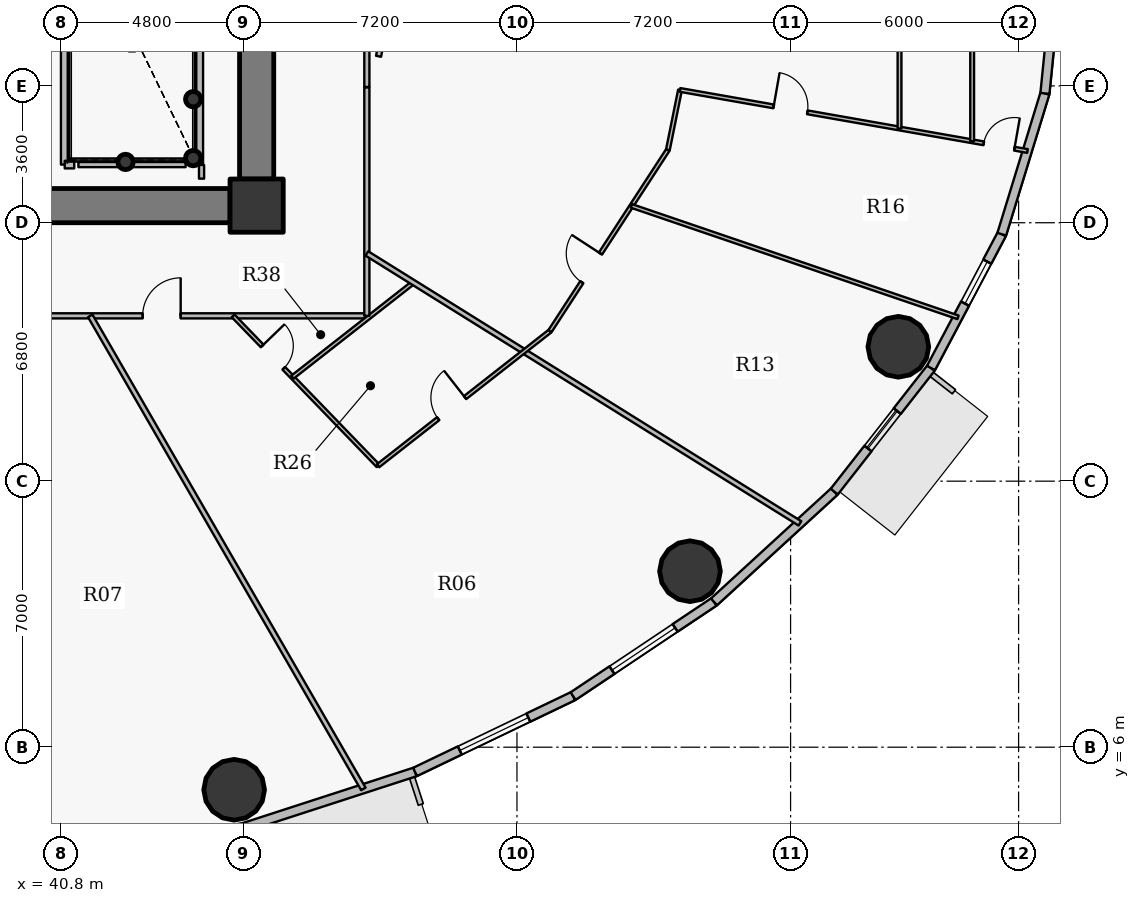
"""IFC4 building model, lengths in metres.
Left out: names, types, materials, properties, quantities, classifications, styles, units other than length and angle.
Written with IfcOpenShell. Run it as: python <this file> out.ifc"""

import sys

from ifc_helpers import new_model, si_unit, direction, frame, frame_2d, origin, origin_2d, place, context, subcontext, project, spatial, rectangle, hollow_circle, extrude, source, transform, mapped, element, fill, save


model = new_model("IFC4")
c1 = context("Model", 3, precision=1e-05, world=origin(), true_north=direction((0.0, 1.0)))
c2 = subcontext(c1, "Body", "Model", "MODEL_VIEW")
j1 = project(units=[si_unit("LENGTHUNIT", "METRE"), si_unit("PLANEANGLEUNIT", "RADIAN")], contexts=[c1])
p1 = place(None, origin())
s1 = spatial("IfcSite", under=j1, at=p1, CompositionType="ELEMENT")
p2 = place(p1, origin())
s2 = spatial("IfcBuilding", under=s1, at=p2, CompositionType="ELEMENT")
p3 = place(p2, frame((0.0, 0.0, 66.0)))
s3 = spatial("IfcBuildingStorey", under=s2, at=p3, CompositionType="ELEMENT", Elevation=66.0)
p4 = place(p3, frame((45.95, 20.25, 0.0), z_axis=(0.0, 0.0, 1.0), x_axis=(1.0, 0.0, 0.0)))
e1 = element("IfcColumn", 1, at=p4, inside=s3, PredefinedType="COLUMN", context=c2, shape_type="SweptSolid", body=[
    extrude(rectangle(XDim=1.4, YDim=1.4, at=origin_2d()), origin(), (0.0, 0.0, 1.0), 4.2),
])
for number, where, z_axis, x_axis in (
    (2, (44.28, 21.5, 0.0), (0.0, 0.0, 1.0), (1.0, 0.0, 0.0)),
    (3, (44.28, 23.05, 0.0), (0.0, 0.0, 1.0), (1.0, 0.0, 0.0)),
    (4, (42.5, 21.4, 0.0), (0.0, 0.0, 1.0), (1.0, 0.0, 0.0)),
):
    element("IfcColumn", number, at=place(p3, frame(where, z_axis=z_axis, x_axis=x_axis)), inside=s3, PredefinedType="COLUMN", context=c2, shape_type="SweptSolid", body=[
        extrude(hollow_circle(Radius=0.203, WallThickness=0.016, at=origin_2d()), origin(), (0.0, 0.0, 1.0), 4.2),
    ])
p5 = place(p3, frame((45.95, 33.05, 0.0), z_axis=(0.0, 0.0, 1.0), x_axis=(0.0, -1.0, 0.0)))
e5 = element("IfcWall", 5, at=p5, inside=s3, PredefinedType="SHEAR", context=c2, shape_type="SweptSolid", body=[
    extrude(rectangle(XDim=12.1, YDim=0.9, at=frame_2d((6.05, 0.0))), origin(), (0.0, 0.0, 1.0), 3.4),
])
p6 = place(p5, frame((5.64, 0.0, 0.0)))
e6 = element("IfcOpeningElement", 6, at=p6, cuts=e5, PredefinedType="OPENING", context=c2, shape_type="SweptSolid", body=[
    extrude(rectangle(XDim=0.82, YDim=2.1, at=origin_2d()), frame((0.41, 0.46, 1.05), z_axis=(0.0, -1.0, 0.0), x_axis=(1.0, 0.0, 0.0)), (0.0, 0.0, 1.0), 0.92),
])
p7 = place(p3, frame((45.25, 20.25, 0.0), z_axis=(0.0, 0.0, 1.0), x_axis=(-1.0, 0.0, 0.0)))
e7 = element("IfcWall", 7, at=p7, inside=s3, PredefinedType="SHEAR", context=c2, shape_type="SweptSolid", body=[
    extrude(rectangle(XDim=18.5, YDim=0.9, at=frame_2d((9.25, 0.0))), origin(), (0.0, 0.0, 1.0), 3.4),
])
p8 = place(p7, frame((10.0, 0.0, 0.0)))
e8 = element("IfcOpeningElement", 8, at=p8, cuts=e7, PredefinedType="OPENING", context=c2, shape_type="SweptSolid", body=[
    extrude(rectangle(XDim=1.15, YDim=2.15, at=origin_2d()), frame((0.575, 0.46, 1.075), z_axis=(0.0, -1.0, 0.0), x_axis=(1.0, 0.0, 0.0)), (0.0, 0.0, 1.0), 0.92),
])
for number, where, z_axis, x_axis in (
    (9, (45.358, 4.88, 0.0), (0.0, 0.0, 1.0), (1.0, 0.0, 0.0)),
    (10, (57.353, 10.631, 0.0), (0.0, 0.0, 1.0), (1.0, 0.0, 0.0)),
    (11, (62.835, 16.536, 0.0), (0.0, 0.0, 1.0), (1.0, 0.0, 0.0)),
):
    element("IfcColumn", number, at=place(p3, frame(where, z_axis=z_axis, x_axis=x_axis)), inside=s3, PredefinedType="COLUMN", context=c2, shape_type="SweptSolid", body=[
        extrude(hollow_circle(Radius=0.8, WallThickness=0.045, at=origin_2d()), origin(), (0.0, 0.0, 1.0), 4.2),
    ])
p9 = place(p3, frame((50.118, 5.349, 0.0), z_axis=(0.0, 0.0, 1.0), x_axis=(-0.951207699013, -0.308551313946, 0.0)))
e12 = element("IfcWall", 12, at=p9, inside=s3, PredefinedType="SOLIDWALL", context=c2, shape_type="SweptSolid", body=[
    extrude(rectangle(XDim=4.739, YDim=0.24, at=frame_2d((2.369, 0.0))), origin(), (0.0, 0.0, 1.0), 3.95),
])
p10 = place(p3, frame((54.277, 7.344, 0.0), z_axis=(0.0, 0.0, 1.0), x_axis=(-0.901601503137, -0.432567601123, 0.0)))
e13 = element("IfcWall", 13, at=p10, inside=s3, PredefinedType="SOLIDWALL", context=c2, shape_type="SweptSolid", body=[
    extrude(rectangle(XDim=4.613, YDim=0.24, at=frame_2d((2.306, 0.0))), origin(), (0.0, 0.0, 1.0), 3.95),
])
p11 = place(p10, frame((1.307, 0.0, 0.9)))
e14 = element("IfcOpeningElement", 14, at=p11, cuts=e13, PredefinedType="OPENING", context=c2, shape_type="SweptSolid", body=[
    extrude(rectangle(XDim=2.0, YDim=1.75, at=origin_2d()), frame((1.0, 0.13, 0.875), z_axis=(0.0, -1.0, 0.0), x_axis=(1.0, 0.0, 0.0)), (0.0, 0.0, 1.0), 0.26),
])
p12 = place(p3, frame((57.985, 9.824, 0.0), z_axis=(0.0, 0.0, 1.0), x_axis=(-0.831240982525, -0.555912249343, 0.0)))
e15 = element("IfcWall", 15, at=p12, inside=s3, PredefinedType="SOLIDWALL", context=c2, shape_type="SweptSolid", body=[
    extrude(rectangle(XDim=4.46, YDim=0.24, at=frame_2d((2.23, 0.0))), origin(), (0.0, 0.0, 1.0), 3.95),
])
p13 = place(p12, frame((1.23, 0.0, 0.9)))
e16 = element("IfcOpeningElement", 16, at=p13, cuts=e15, PredefinedType="OPENING", context=c2, shape_type="SweptSolid", body=[
    extrude(rectangle(XDim=2.0, YDim=1.75, at=origin_2d()), frame((1.0, 0.13, 0.875), z_axis=(0.0, -1.0, 0.0), x_axis=(1.0, 0.0, 0.0)), (0.0, 0.0, 1.0), 0.26),
])
p14 = place(p3, frame((61.15, 12.725, 0.0), z_axis=(0.0, 0.0, 1.0), x_axis=(-0.737116376281, -0.67576582321, 0.0)))
e17 = element("IfcWall", 17, at=p14, inside=s3, PredefinedType="SOLIDWALL", context=c2, shape_type="SweptSolid", body=[
    extrude(rectangle(XDim=4.294, YDim=0.24, at=frame_2d((2.147, 0.0))), origin(), (0.0, 0.0, 1.0), 3.95),
])
p15 = place(p3, frame((63.695, 15.977, 0.0), z_axis=(0.0, 0.0, 1.0), x_axis=(-0.616295508253, -0.787514981767, 0.0)))
e18 = element("IfcWall", 18, at=p15, inside=s3, PredefinedType="SOLIDWALL", context=c2, shape_type="SweptSolid", body=[
    extrude(rectangle(XDim=4.129, YDim=0.24, at=frame_2d((2.065, 0.0))), origin(), (0.0, 0.0, 1.0), 3.95),
])
p16 = place(p15, frame((1.44, 0.0, 0.9)))
e19 = element("IfcOpeningElement", 19, at=p16, cuts=e18, PredefinedType="OPENING", context=c2, shape_type="SweptSolid", body=[
    extrude(rectangle(XDim=1.25, YDim=1.65, at=origin_2d()), frame((0.625, 0.13, 0.825), z_axis=(0.0, -1.0, 0.0), x_axis=(1.0, 0.0, 0.0)), (0.0, 0.0, 1.0), 0.26),
])
p17 = place(p3, frame((65.558, 19.499, 0.0), z_axis=(0.0, 0.0, 1.0), x_axis=(-0.467662443071, -0.883907144072, 0.0)))
e20 = element("IfcWall", 20, at=p17, inside=s3, PredefinedType="SOLIDWALL", context=c2, shape_type="SweptSolid", body=[
    extrude(rectangle(XDim=3.984, YDim=0.24, at=frame_2d((1.992, 0.0))), origin(), (0.0, 0.0, 1.0), 3.95),
])
p18 = place(p17, frame((0.817, 0.0, 0.9)))
e21 = element("IfcOpeningElement", 21, at=p18, cuts=e20, PredefinedType="OPENING", context=c2, shape_type="SweptSolid", body=[
    extrude(rectangle(XDim=1.25, YDim=1.65, at=origin_2d()), frame((0.625, 0.13, 0.825), z_axis=(0.0, -1.0, 0.0), x_axis=(1.0, 0.0, 0.0)), (0.0, 0.0, 1.0), 0.26),
])
p19 = place(p3, frame((66.693, 23.203, 0.0), z_axis=(0.0, 0.0, 1.0), x_axis=(-0.293111631758, -0.956078224482, 0.0)))
e22 = element("IfcWall", 22, at=p19, inside=s3, PredefinedType="SOLIDWALL", context=c2, shape_type="SweptSolid", body=[
    extrude(rectangle(XDim=3.875, YDim=0.24, at=frame_2d((1.938, 0.0))), origin(), (0.0, 0.0, 1.0), 3.95),
])
p20 = place(p3, frame((67.075, 27.0, 0.0), z_axis=(0.0, 0.0, 1.0), x_axis=(-0.099997795174, -0.994987658698, 0.0)))
e23 = element("IfcWall", 23, at=p20, inside=s3, PredefinedType="SOLIDWALL", context=c2, shape_type="SweptSolid", body=[
    extrude(rectangle(XDim=3.816, YDim=0.24, at=frame_2d((1.908, 0.0))), origin(), (0.0, 0.0, 1.0), 3.95),
])
p21 = place(p3, frame((37.362, 17.35, 0.0), z_axis=(0.0, 0.0, 1.0), x_axis=(1.0, 0.0, 0.0)))
e24 = element("IfcWall", 24, at=p21, inside=s3, PredefinedType="PARTITIONING", context=c2, shape_type="SweptSolid", body=[
    extrude(rectangle(XDim=11.488, YDim=0.135, at=frame_2d((5.744, 0.0))), origin(), (0.0, 0.0, 1.0), 3.285),
])
p22 = place(p21, frame((1.625, 0.0, 0.0)))
e25 = element("IfcOpeningElement", 25, at=p22, cuts=e24, PredefinedType="OPENING", context=c2, shape_type="SweptSolid", body=[
    extrude(rectangle(XDim=1.0, YDim=2.15, at=origin_2d()), frame((0.5, 0.078, 1.075), z_axis=(0.0, -1.0, 0.0), x_axis=(1.0, 0.0, 0.0)), (0.0, 0.0, 1.0), 0.155),
])
p23 = place(p21, frame((5.589, 0.0, 0.0)))
e26 = element("IfcOpeningElement", 26, at=p23, cuts=e24, PredefinedType="OPENING", context=c2, shape_type="SweptSolid", body=[
    extrude(rectangle(XDim=1.0, YDim=2.15, at=origin_2d()), frame((0.5, 0.078, 1.075), z_axis=(0.0, -1.0, 0.0), x_axis=(1.0, 0.0, 0.0)), (0.0, 0.0, 1.0), 0.155),
])
p24 = place(p3, frame((40.9, 21.33, 0.0), z_axis=(0.0, 0.0, 1.0), x_axis=(0.0, 1.0, 0.0)))
e27 = element("IfcWall", 27, at=p24, inside=s3, PredefinedType="PARTITIONING", context=c2, shape_type="SweptSolid", body=[
    extrude(rectangle(XDim=5.91, YDim=0.2, at=frame_2d((2.955, 0.0))), origin(), (0.0, 0.0, 1.0), 3.485),
])
p25 = place(p3, frame((40.9, 21.33, 0.0), z_axis=(0.0, 0.0, 1.0), x_axis=(1.0, 0.0, 0.0)))
e28 = element("IfcWall", 28, at=p25, inside=s3, PredefinedType="PARTITIONING", context=c2, shape_type="SweptSolid", body=[
    extrude(rectangle(XDim=0.25, YDim=0.2, at=frame_2d((0.125, 0.0))), origin(), (0.0, 0.0, 1.0), 3.485),
])
p26 = place(p3, frame((41.572, 17.35, 0.0), z_axis=(0.0, 0.0, 1.0), x_axis=(0.499990052844, -0.866031146701, 0.0)))
e29 = element("IfcWall", 29, at=p26, inside=s3, PredefinedType="PARTITIONING", context=c2, shape_type="SweptSolid", body=[
    extrude(rectangle(XDim=14.373, YDim=0.135, at=frame_2d((7.187, 0.0))), origin(), (0.0, 0.0, 1.0), 3.335),
])
p27 = place(p3, frame((44.44, 21.33, 0.0), z_axis=(0.0, 0.0, 1.0), x_axis=(0.0, 1.0, 0.0)))
e30 = element("IfcWall", 30, at=p27, inside=s3, PredefinedType="PARTITIONING", context=c2, shape_type="SweptSolid", body=[
    extrude(rectangle(XDim=8.52, YDim=0.2, at=frame_2d((4.26, 0.0))), origin(), (0.0, 0.0, 1.0), 3.95),
])
p28 = place(p3, frame((45.33, 17.35, 0.0), z_axis=(0.0, 0.0, 1.0), x_axis=(0.695082659364, -0.718929827348, 0.0)))
e31 = element("IfcWall", 31, at=p28, inside=s3, PredefinedType="PARTITIONING", context=c2, shape_type="SweptSolid", body=[
    extrude(rectangle(XDim=5.487, YDim=0.1, at=frame_2d((2.744, 0.0))), origin(), (0.0, 0.0, 1.0), 3.95),
])
p29 = place(p28, frame((1.1, 0.0, 0.0)))
e32 = element("IfcOpeningElement", 32, at=p29, cuts=e31, PredefinedType="OPENING", context=c2, shape_type="SweptSolid", body=[
    extrude(rectangle(XDim=0.82, YDim=2.1, at=origin_2d()), frame((0.41, 0.06, 1.05), z_axis=(0.0, -1.0, 0.0), x_axis=(1.0, 0.0, 0.0)), (0.0, 0.0, 1.0), 0.12),
])
p30 = place(p3, frame((46.891, 15.736, 0.0), z_axis=(0.0, 0.0, 1.0), x_axis=(0.787335515078, 0.61652476568, 0.0)))
e33 = element("IfcWall", 33, at=p30, inside=s3, PredefinedType="PARTITIONING", context=c2, shape_type="SweptSolid", body=[
    extrude(rectangle(XDim=4.043, YDim=0.1, at=frame_2d((2.022, 0.0))), origin(), (0.0, 0.0, 1.0), 3.285),
])
p31 = place(p3, frame((48.85, 17.35, 0.0), z_axis=(0.0, 0.0, 1.0), x_axis=(0.0, 1.0, 0.0)))
e34 = element("IfcWall", 34, at=p31, inside=s3, PredefinedType="PARTITIONING", context=c2, shape_type="SweptSolid", body=[
    extrude(rectangle(XDim=6.011, YDim=0.135, at=frame_2d((3.006, 0.0))), origin(), (0.0, 0.0, 1.0), 3.285),
])
p32 = place(p3, frame((48.85, 18.991, 0.0), z_axis=(0.0, 0.0, 1.0), x_axis=(0.848674864049, -0.528914903488, 0.0)))
e35 = element("IfcWall", 35, at=p32, inside=s3, PredefinedType="PARTITIONING", context=c2, shape_type="SweptSolid", body=[
    extrude(rectangle(XDim=13.427, YDim=0.135, at=frame_2d((6.714, 0.0))), origin(), (0.0, 0.0, 1.0), 3.335),
])
p33 = place(p3, frame((49.144, 13.405, 0.0), z_axis=(0.0, 0.0, 1.0), x_axis=(0.787337339938, 0.616522435228, 0.0)))
e36 = element("IfcWall", 36, at=p33, inside=s3, PredefinedType="PARTITIONING", context=c2, shape_type="SweptSolid", body=[
    extrude(rectangle(XDim=5.747, YDim=0.1, at=frame_2d((2.874, 0.0))), origin(), (0.0, 0.0, 1.0), 3.285),
])
p34 = place(p33, frame((2.01, 0.0, 0.0)))
e37 = element("IfcOpeningElement", 37, at=p34, cuts=e36, PredefinedType="OPENING", context=c2, shape_type="SweptSolid", body=[
    extrude(rectangle(XDim=0.9, YDim=2.1, at=origin_2d()), frame((0.45, 0.06, 1.05), z_axis=(0.0, -1.0, 0.0), x_axis=(1.0, 0.0, 0.0)), (0.0, 0.0, 1.0), 0.12),
])
p35 = place(p3, frame((53.669, 16.948, 0.0), z_axis=(0.0, 0.0, 1.0), x_axis=(0.545413765252, 0.8381669432, 0.0)))
e38 = element("IfcWall", 38, at=p35, inside=s3, PredefinedType="PARTITIONING", context=c2, shape_type="SweptSolid", body=[
    extrude(rectangle(XDim=5.688, YDim=0.1, at=frame_2d((2.844, 0.0))), origin(), (0.0, 0.0, 1.0), 3.285),
])
p36 = place(p35, frame((1.535, 0.0, 0.0)))
e39 = element("IfcOpeningElement", 39, at=p36, cuts=e38, PredefinedType="OPENING", context=c2, shape_type="SweptSolid", body=[
    extrude(rectangle(XDim=0.9, YDim=2.1, at=origin_2d()), frame((0.45, 0.06, 1.05), z_axis=(0.0, -1.0, 0.0), x_axis=(1.0, 0.0, 0.0)), (0.0, 0.0, 1.0), 0.12),
])
p37 = place(p3, frame((55.812, 20.242, 0.0), z_axis=(0.0, 0.0, 1.0), x_axis=(0.946449887069, -0.322850756955, 0.0)))
e40 = element("IfcWall", 40, at=p37, inside=s3, PredefinedType="PARTITIONING", context=c2, shape_type="SweptSolid", body=[
    extrude(rectangle(XDim=9.08, YDim=0.1, at=frame_2d((4.54, 0.0))), origin(), (0.0, 0.0, 1.0), 3.335),
])
p38 = place(p3, frame((56.771, 21.716, 0.0), z_axis=(0.0, 0.0, 1.0), x_axis=(0.198302290641, 0.980140909016, 0.0)))
e41 = element("IfcWall", 41, at=p38, inside=s3, PredefinedType="PARTITIONING", context=c2, shape_type="SweptSolid", body=[
    extrude(rectangle(XDim=1.61, YDim=0.1, at=frame_2d((0.805, 0.0))), origin(), (0.0, 0.0, 1.0), 3.95),
])
p39 = place(p3, frame((57.09, 23.294, 0.0), z_axis=(0.0, 0.0, 1.0), x_axis=(0.984913803966, -0.173045655125, 0.0)))
e42 = element("IfcWall", 42, at=p39, inside=s3, PredefinedType="PARTITIONING", context=c2, shape_type="SweptSolid", body=[
    extrude(rectangle(XDim=9.283, YDim=0.1, at=frame_2d((4.642, 0.0))), origin(), (0.0, 0.0, 1.0), 3.335),
])
p40 = place(p39, frame((2.502, 0.0, 0.0)))
e43 = element("IfcOpeningElement", 43, at=p40, cuts=e42, PredefinedType="OPENING", context=c2, shape_type="SweptSolid", body=[
    extrude(rectangle(XDim=0.9, YDim=2.1, at=origin_2d()), frame((0.45, 0.06, 1.05), z_axis=(0.0, -1.0, 0.0), x_axis=(1.0, 0.0, 0.0)), (0.0, 0.0, 1.0), 0.12),
])
p41 = place(p39, frame((8.115, 0.0, 0.0)))
e44 = element("IfcOpeningElement", 44, at=p41, cuts=e42, PredefinedType="OPENING", context=c2, shape_type="SweptSolid", body=[
    extrude(rectangle(XDim=0.82, YDim=2.1, at=origin_2d()), frame((0.41, 0.06, 1.05), z_axis=(0.0, -1.0, 0.0), x_axis=(1.0, 0.0, 0.0)), (0.0, 0.0, 1.0), 0.12),
])
p42 = place(p3, frame((62.867, 22.279, 0.0), z_axis=(0.0, 0.0, 1.0), x_axis=(0.0, 1.0, 0.0)))
e45 = element("IfcWall", 45, at=p42, inside=s3, PredefinedType="PARTITIONING", context=c2, shape_type="SweptSolid", body=[
    extrude(rectangle(XDim=10.432, YDim=0.1, at=frame_2d((5.216, 0.0))), origin(), (0.0, 0.0, 1.0), 3.285),
])
p43 = place(p42, frame((4.766, 0.0, 0.0)))
e46 = element("IfcOpeningElement", 46, at=p43, cuts=e45, PredefinedType="OPENING", context=c2, shape_type="SweptSolid", body=[
    extrude(rectangle(XDim=0.9, YDim=2.1, at=origin_2d()), frame((0.45, 0.06, 1.05), z_axis=(0.0, -1.0, 0.0), x_axis=(1.0, 0.0, 0.0)), (0.0, 0.0, 1.0), 0.12),
])
p44 = place(p3, frame((64.778, 21.943, 0.0), z_axis=(0.0, 0.0, 1.0), x_axis=(0.0, 1.0, 0.0)))
e47 = element("IfcWall", 47, at=p44, inside=s3, PredefinedType="PARTITIONING", context=c2, shape_type="SweptSolid", body=[
    extrude(rectangle(XDim=11.174, YDim=0.1, at=frame_2d((5.587, 0.0))), origin(), (0.0, 0.0, 1.0), 3.285),
])
p45 = place(p3, frame((44.08, 21.33, 0.0), z_axis=(0.0, 0.0, 1.0), x_axis=(-1.0, 0.0, 0.0)))
e48 = element("IfcWall", 48, at=p45, inside=s3, PredefinedType="PARTITIONING", context=c2, shape_type="SweptSolid", body=[
    extrude(rectangle(XDim=2.82, YDim=0.135, at=frame_2d((1.41, 0.0))), origin(), (0.0, 0.0, 1.0), 3.485),
])
p46 = place(p3, frame((44.5, 20.96, 0.0), z_axis=(0.0, 0.0, 1.0), x_axis=(0.0, 1.0, 0.0)))
e49 = element("IfcWall", 49, at=p46, inside=s3, PredefinedType="PARTITIONING", context=c2, shape_type="SweptSolid", body=[
    extrude(rectangle(XDim=0.36, YDim=0.135, at=frame_2d((0.18, 0.0))), origin(), (0.0, 0.0, 1.0), 3.95),
])
p47 = place(p3, frame((48.85, 24.732, 0.0), z_axis=(0.0, 0.0, 1.0), x_axis=(0.0, -1.0, 0.0)))
e50 = element("IfcWall", 50, at=p47, inside=s3, PredefinedType="PARTITIONING", context=c2, shape_type="SweptSolid", body=[
    extrude(rectangle(XDim=1.36, YDim=0.135, at=frame_2d((0.68, 0.0))), origin(), (0.0, 0.0, 1.0), 3.95),
])
p48 = place(p3, frame((45.26, 19.8, 0.0), z_axis=(0.0, 0.0, 1.0), x_axis=(1.0, 0.0, 0.0)))
e51 = element("IfcWall", 51, at=p48, inside=s3, PredefinedType="PARTITIONING", context=c2, shape_type="SweptSolid", body=[
    extrude(rectangle(XDim=1.14, YDim=0.135, at=frame_2d((0.57, 0.0))), origin(), (0.0, 0.0, 1.0), 3.285),
])
p49 = place(p3, frame((46.4, 20.107, 0.0), z_axis=(0.0, 0.0, 1.0), x_axis=(0.0, 1.0, 0.0)))
e52 = element("IfcWall", 52, at=p49, inside=s3, PredefinedType="PARTITIONING", context=c2, shape_type="SweptSolid", body=[
    extrude(rectangle(XDim=0.833, YDim=0.135, at=frame_2d((0.416, 0.0))), origin(), (0.0, 0.0, 1.0), 3.95),
])
p50 = place(p3, frame((49.157, 24.18, 0.0), z_axis=(0.0, 0.0, 1.0), x_axis=(0.198365081381, 0.980128203088, 0.0)))
e53 = element("IfcWall", 53, at=p50, inside=s3, PredefinedType="PARTITIONING", context=c2, shape_type="SweptSolid", body=[
    extrude(rectangle(XDim=0.501, YDim=0.135, at=frame_2d((0.25, 0.0))), origin(), (0.0, 0.0, 1.0), 3.95),
])
m1 = source(origin(), c2, "Body", "SweptSolid", [
    extrude(rectangle(XDim=2.0, YDim=1.75, at=origin_2d()), frame((1.0, 0.03, 0.875), z_axis=(0.0, -1.0, 0.0), x_axis=(1.0, 0.0, 0.0)), (0.0, 0.0, 1.0), 0.06),
])
p51 = place(p11, origin())
e54 = element("IfcWindow", 54, at=p51, inside=s3, PartitioningType="DOUBLE_PANEL_VERTICAL", PredefinedType="WINDOW", context=c2, shape_type="MappedRepresentation", body=[
    mapped(m1, transform((0.0, 0.0, 0.0), x_axis=(1.0, 0.0, 0.0), y_axis=(0.0, 1.0, 0.0), z_axis=(0.0, 0.0, 1.0), scale=1.0)),
])
fill(e14, e54)
p52 = place(p13, origin())
e55 = element("IfcWindow", 55, at=p52, inside=s3, PartitioningType="DOUBLE_PANEL_VERTICAL", PredefinedType="WINDOW", context=c2, shape_type="MappedRepresentation", body=[
    mapped(m1, transform((0.0, 0.0, 0.0), x_axis=(1.0, 0.0, 0.0), y_axis=(0.0, 1.0, 0.0), z_axis=(0.0, 0.0, 1.0), scale=1.0)),
])
fill(e16, e55)
m2 = source(origin(), c2, "Body", "SweptSolid", [
    extrude(rectangle(XDim=1.25, YDim=1.65, at=origin_2d()), frame((0.625, 0.03, 0.825), z_axis=(0.0, -1.0, 0.0), x_axis=(1.0, 0.0, 0.0)), (0.0, 0.0, 1.0), 0.06),
])
p53 = place(p18, origin())
e56 = element("IfcWindow", 56, at=p53, inside=s3, PartitioningType="SINGLE_PANEL", PredefinedType="WINDOW", context=c2, shape_type="MappedRepresentation", body=[
    mapped(m2, transform((0.0, 0.0, 0.0), x_axis=(1.0, 0.0, 0.0), y_axis=(0.0, 1.0, 0.0), z_axis=(0.0, 0.0, 1.0), scale=1.0)),
])
fill(e21, e56)
p54 = place(p16, origin())
e57 = element("IfcWindow", 57, at=p54, inside=s3, PartitioningType="SINGLE_PANEL", PredefinedType="WINDOW", context=c2, shape_type="MappedRepresentation", body=[
    mapped(m2, transform((0.0, 0.0, 0.0), x_axis=(1.0, 0.0, 0.0), y_axis=(0.0, 1.0, 0.0), z_axis=(0.0, 0.0, 1.0), scale=1.0)),
])
fill(e19, e57)
m3 = source(origin(), c2, "Body", "SweptSolid", [
    extrude(rectangle(XDim=1.0, YDim=2.15, at=origin_2d()), frame((0.5, 0.025, 1.075), z_axis=(0.0, -1.0, 0.0), x_axis=(1.0, 0.0, 0.0)), (0.0, 0.0, 1.0), 0.05),
])
p55 = place(p23, origin())
e58 = element("IfcDoor", 58, at=p55, inside=s3, OperationType="SINGLE_SWING_RIGHT", PredefinedType="DOOR", context=c2, shape_type="MappedRepresentation", body=[
    mapped(m3, transform((0.0, 0.0, 0.0), x_axis=(1.0, 0.0, 0.0), y_axis=(0.0, 1.0, 0.0), z_axis=(0.0, 0.0, 1.0), scale=1.0)),
])
fill(e26, e58)
m4 = source(origin(), c2, "Body", "SweptSolid", [
    extrude(rectangle(XDim=0.82, YDim=2.1, at=origin_2d()), frame((0.41, 0.025, 1.05), z_axis=(0.0, -1.0, 0.0), x_axis=(1.0, 0.0, 0.0)), (0.0, 0.0, 1.0), 0.05),
])
p56 = place(p29, origin())
e59 = element("IfcDoor", 59, at=p56, inside=s3, OperationType="SINGLE_SWING_LEFT", PredefinedType="DOOR", context=c2, shape_type="MappedRepresentation", body=[
    mapped(m4, transform((0.0, 0.0, 0.0), x_axis=(1.0, 0.0, 0.0), y_axis=(0.0, 1.0, 0.0), z_axis=(0.0, 0.0, 1.0), scale=1.0)),
])
fill(e32, e59)
m5 = source(origin(), c2, "Body", "SweptSolid", [
    extrude(rectangle(XDim=0.9, YDim=2.1, at=origin_2d()), frame((0.45, 0.025, 1.05), z_axis=(0.0, -1.0, 0.0), x_axis=(1.0, 0.0, 0.0)), (0.0, 0.0, 1.0), 0.05),
])
p57 = place(p34, origin())
e60 = element("IfcDoor", 60, at=p57, inside=s3, OperationType="SINGLE_SWING_RIGHT", PredefinedType="DOOR", context=c2, shape_type="MappedRepresentation", body=[
    mapped(m5, transform((0.0, 0.0, 0.0), x_axis=(1.0, 0.0, 0.0), y_axis=(0.0, 1.0, 0.0), z_axis=(0.0, 0.0, 1.0), scale=1.0)),
])
fill(e37, e60)
p58 = place(p36, origin())
e61 = element("IfcDoor", 61, at=p58, inside=s3, OperationType="SINGLE_SWING_RIGHT", PredefinedType="DOOR", context=c2, shape_type="MappedRepresentation", body=[
    mapped(m5, transform((0.0, 0.0, 0.0), x_axis=(1.0, 0.0, 0.0), y_axis=(0.0, 1.0, 0.0), z_axis=(0.0, 0.0, 1.0), scale=1.0)),
])
fill(e39, e61)
p59 = place(p40, origin())
e62 = element("IfcDoor", 62, at=p59, inside=s3, OperationType="SINGLE_SWING_LEFT", PredefinedType="DOOR", context=c2, shape_type="MappedRepresentation", body=[
    mapped(m5, transform((0.0, 0.0, 0.0), x_axis=(1.0, 0.0, 0.0), y_axis=(0.0, 1.0, 0.0), z_axis=(0.0, 0.0, 1.0), scale=1.0)),
])
fill(e43, e62)
p60 = place(p41, origin())
e63 = element("IfcDoor", 63, at=p60, inside=s3, OperationType="SINGLE_SWING_RIGHT", PredefinedType="DOOR", context=c2, shape_type="MappedRepresentation", body=[
    mapped(m4, transform((0.0, 0.0, 0.0), x_axis=(1.0, 0.0, 0.0), y_axis=(0.0, 1.0, 0.0), z_axis=(0.0, 0.0, 1.0), scale=1.0)),
])
fill(e44, e63)
save(model, sys.argv[1])
